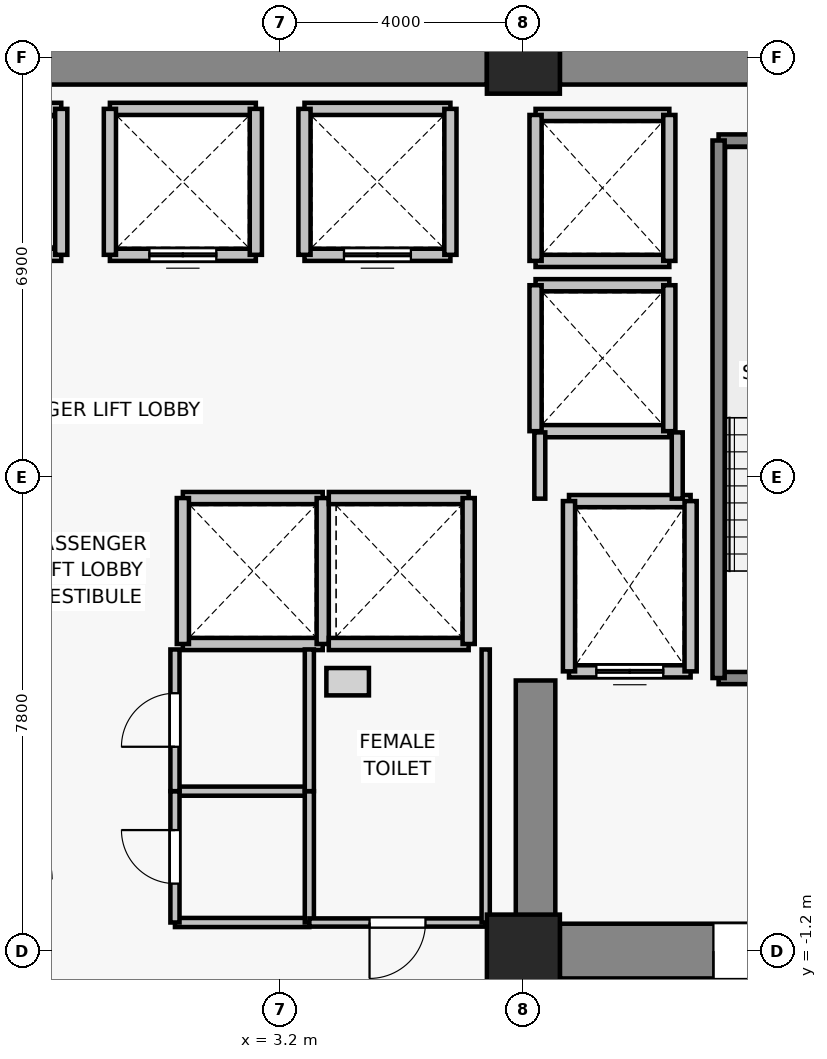
"""IFC4 building model, lengths in metres.
Left out: names, types, materials, properties, quantities, classifications, styles, units other than length and angle.
Written with IfcOpenShell. Run it as: python <this file> out.ifc"""

import sys

from ifc_helpers import new_model, si_unit, direction, frame, frame_2d, origin, origin_2d, place, context, subcontext, project, spatial, rectangle, extrude, source, transform, mapped, element, fill, save


model = new_model("IFC4")
c1 = context("Model", 3, precision=1e-05, world=origin(), true_north=direction((0.0, 1.0)))
c2 = subcontext(c1, "Body", "Model", "MODEL_VIEW")
j1 = project(units=[si_unit("LENGTHUNIT", "METRE"), si_unit("PLANEANGLEUNIT", "RADIAN")], contexts=[c1])
p1 = place(None, origin())
s1 = spatial("IfcSite", under=j1, at=p1, CompositionType="ELEMENT")
p2 = place(p1, origin())
s2 = spatial("IfcBuilding", under=s1, at=p2, CompositionType="ELEMENT")
p3 = place(p2, frame((0.0, 0.0, 47.2)))
s3 = spatial("IfcBuildingStorey", under=s2, at=p3, CompositionType="ELEMENT", Elevation=47.2)
for number, where, z_axis, x_axis in (
    (1, (7.2, -1.2, 0.0), (0.0, 0.0, 1.0), (1.0, 0.0, 0.0)),
    (2, (7.2, 13.5, 0.0), (0.0, 0.0, 1.0), (1.0, 0.0, 0.0)),
):
    element("IfcColumn", number, at=place(p3, frame(where, z_axis=z_axis, x_axis=x_axis)), inside=s3, PredefinedType="COLUMN", context=c2, shape_type="SweptSolid", body=[
        extrude(rectangle(XDim=1.2, YDim=1.2, at=origin_2d()), origin(), (0.0, 0.0, 1.0), 3.3),
    ])
p4 = place(p3, frame((-6.6, 13.5, 0.0), z_axis=(0.0, 0.0, 1.0), x_axis=(1.0, 0.0, 0.0)))
e3 = element("IfcWall", 3, at=p4, inside=s3, PredefinedType="SHEAR", context=c2, shape_type="SweptSolid", body=[
    extrude(rectangle(XDim=13.2, YDim=0.9, at=frame_2d((6.6, 0.0))), origin(), (0.0, 0.0, 1.0), 3.075),
])
p5 = place(p3, frame((7.8, 13.5, 0.0), z_axis=(0.0, 0.0, 1.0), x_axis=(1.0, 0.0, 0.0)))
e4 = element("IfcWall", 4, at=p5, inside=s3, PredefinedType="SHEAR", context=c2, shape_type="SweptSolid", body=[
    extrude(rectangle(XDim=6.0, YDim=0.9, at=frame_2d((3.0, 0.0))), origin(), (0.0, 0.0, 1.0), 3.075),
])
p6 = place(p3, frame((13.8, -1.2, 0.0), z_axis=(0.0, 0.0, 1.0), x_axis=(-1.0, 0.0, 0.0)))
e5 = element("IfcWall", 5, at=p6, inside=s3, PredefinedType="SHEAR", context=c2, shape_type="SweptSolid", body=[
    extrude(rectangle(XDim=6.0, YDim=0.9, at=frame_2d((3.0, 0.0))), origin(), (0.0, 0.0, 1.0), 3.075),
])
p7 = place(p6, frame((2.325, 0.0, 0.0)))
e6 = element("IfcOpeningElement", 6, at=p7, cuts=e5, PredefinedType="OPENING", context=c2, shape_type="SweptSolid", body=[
    extrude(rectangle(XDim=1.15, YDim=2.15, at=frame_2d((0.575, 1.075))), frame((0.0, 0.46, 0.0), z_axis=(0.0, -1.0, 0.0), x_axis=(1.0, 0.0, 0.0)), (0.0, 0.0, 1.0), 0.92),
])
p8 = place(p3, frame((7.4, -0.75, 0.0), z_axis=(0.0, 0.0, 1.0), x_axis=(0.0, 1.0, 0.0)))
e7 = element("IfcWall", 7, at=p8, inside=s3, PredefinedType="SHEAR", context=c2, shape_type="SweptSolid", body=[
    extrude(rectangle(XDim=4.0, YDim=0.65, at=frame_2d((2.0, 0.0))), origin(), (0.0, 0.0, 1.0), 3.075),
])
p9 = place(p3, frame((9.95, 3.4, 0.0), z_axis=(0.0, 0.0, 1.0), x_axis=(-1.0, 0.0, 0.0)))
e8 = element("IfcWall", 8, at=p9, inside=s3, PredefinedType="SOLIDWALL", context=c2, shape_type="SweptSolid", body=[
    extrude(rectangle(XDim=2.0, YDim=0.2, at=frame_2d((1.0, 0.0))), origin(), (0.0, 0.0, 1.0), 3.075),
])
p10 = place(p9, frame((0.45, 0.0, 0.0)))
e9 = element("IfcOpeningElement", 9, at=p10, cuts=e8, PredefinedType="OPENING", context=c2, shape_type="SweptSolid", body=[
    extrude(rectangle(XDim=1.1, YDim=2.2, at=frame_2d((0.55, 1.1))), frame((0.0, 0.11, 0.0), z_axis=(0.0, -1.0, 0.0), x_axis=(1.0, 0.0, 0.0)), (0.0, 0.0, 1.0), 0.22),
])
p11 = place(p3, frame((7.95, 6.2, 0.0), z_axis=(0.0, 0.0, 1.0), x_axis=(1.0, 0.0, 0.0)))
e10 = element("IfcWall", 10, at=p11, inside=s3, PredefinedType="SOLIDWALL", context=c2, shape_type="SweptSolid", body=[
    extrude(rectangle(XDim=2.0, YDim=0.2, at=frame_2d((1.0, 0.0))), origin(), (0.0, 0.0, 1.0), 3.075),
])
for number, where, z_axis, x_axis in (
    (11, (7.95, 3.4, 0.0), (0.0, 0.0, 1.0), (0.0, 1.0, 0.0)),
    (12, (9.95, 6.2, 0.0), (0.0, 0.0, 1.0), (0.0, -1.0, 0.0)),
):
    element("IfcWall", number, at=place(p3, frame(where, z_axis=z_axis, x_axis=x_axis)), inside=s3, PredefinedType="SOLIDWALL", context=c2, shape_type="SweptSolid", body=[
        extrude(rectangle(XDim=2.8, YDim=0.2, at=frame_2d((1.4, 0.0))), origin(), (0.0, 0.0, 1.0), 3.075),
    ])
p12 = place(p3, frame((-0.4, 10.25, 0.0), z_axis=(0.0, 0.0, 1.0), x_axis=(-1.0, 0.0, 0.0)))
e13 = element("IfcWall", 13, at=p12, inside=s3, PredefinedType="SOLIDWALL", context=c2, shape_type="SweptSolid", body=[
    extrude(rectangle(XDim=2.4, YDim=0.2, at=frame_2d((1.2, 0.0))), origin(), (0.0, 0.0, 1.0), 3.075),
])
p13 = place(p12, frame((0.65, 0.0, 0.0)))
e14 = element("IfcOpeningElement", 14, at=p13, cuts=e13, PredefinedType="OPENING", context=c2, shape_type="SweptSolid", body=[
    extrude(rectangle(XDim=1.1, YDim=2.2, at=frame_2d((0.55, 1.1))), frame((0.0, 0.11, 0.0), z_axis=(0.0, -1.0, 0.0), x_axis=(1.0, 0.0, 0.0)), (0.0, 0.0, 1.0), 0.22),
])
p14 = place(p3, frame((-2.8, 12.65, 0.0), z_axis=(0.0, 0.0, 1.0), x_axis=(1.0, 0.0, 0.0)))
e15 = element("IfcWall", 15, at=p14, inside=s3, PredefinedType="SOLIDWALL", context=c2, shape_type="SweptSolid", body=[
    extrude(rectangle(XDim=2.4, YDim=0.2, at=frame_2d((1.2, 0.0))), origin(), (0.0, 0.0, 1.0), 3.075),
])
p15 = place(p3, frame((-0.4, 12.65, 0.0), z_axis=(0.0, 0.0, 1.0), x_axis=(0.0, -1.0, 0.0)))
e16 = element("IfcWall", 16, at=p15, inside=s3, PredefinedType="SOLIDWALL", context=c2, shape_type="SweptSolid", body=[
    extrude(rectangle(XDim=2.4, YDim=0.2, at=frame_2d((1.2, 0.0))), origin(), (0.0, 0.0, 1.0), 3.075),
])
p16 = place(p3, frame((2.8, 10.25, 0.0), z_axis=(0.0, 0.0, 1.0), x_axis=(-1.0, 0.0, 0.0)))
e17 = element("IfcWall", 17, at=p16, inside=s3, PredefinedType="SOLIDWALL", context=c2, shape_type="SweptSolid", body=[
    extrude(rectangle(XDim=2.4, YDim=0.2, at=frame_2d((1.2, 0.0))), origin(), (0.0, 0.0, 1.0), 3.075),
])
p17 = place(p16, frame((0.65, 0.0, 0.0)))
e18 = element("IfcOpeningElement", 18, at=p17, cuts=e17, PredefinedType="OPENING", context=c2, shape_type="SweptSolid", body=[
    extrude(rectangle(XDim=1.1, YDim=2.2, at=frame_2d((0.55, 1.1))), frame((0.0, 0.11, 0.0), z_axis=(0.0, -1.0, 0.0), x_axis=(1.0, 0.0, 0.0)), (0.0, 0.0, 1.0), 0.22),
])
p18 = place(p3, frame((0.4, 12.65, 0.0), z_axis=(0.0, 0.0, 1.0), x_axis=(1.0, 0.0, 0.0)))
e19 = element("IfcWall", 19, at=p18, inside=s3, PredefinedType="SOLIDWALL", context=c2, shape_type="SweptSolid", body=[
    extrude(rectangle(XDim=2.4, YDim=0.2, at=frame_2d((1.2, 0.0))), origin(), (0.0, 0.0, 1.0), 3.075),
])
for number, where, z_axis, x_axis in (
    (20, (0.4, 10.25, 0.0), (0.0, 0.0, 1.0), (0.0, 1.0, 0.0)),
    (21, (2.8, 12.65, 0.0), (0.0, 0.0, 1.0), (0.0, -1.0, 0.0)),
):
    element("IfcWall", number, at=place(p3, frame(where, z_axis=z_axis, x_axis=x_axis)), inside=s3, PredefinedType="SOLIDWALL", context=c2, shape_type="SweptSolid", body=[
        extrude(rectangle(XDim=2.4, YDim=0.2, at=frame_2d((1.2, 0.0))), origin(), (0.0, 0.0, 1.0), 3.075),
    ])
p19 = place(p3, frame((6.0, 10.25, 0.0), z_axis=(0.0, 0.0, 1.0), x_axis=(-1.0, 0.0, 0.0)))
e22 = element("IfcWall", 22, at=p19, inside=s3, PredefinedType="SOLIDWALL", context=c2, shape_type="SweptSolid", body=[
    extrude(rectangle(XDim=2.4, YDim=0.2, at=frame_2d((1.2, 0.0))), origin(), (0.0, 0.0, 1.0), 3.075),
])
p20 = place(p19, frame((0.65, 0.0, 0.0)))
e23 = element("IfcOpeningElement", 23, at=p20, cuts=e22, PredefinedType="OPENING", context=c2, shape_type="SweptSolid", body=[
    extrude(rectangle(XDim=1.1, YDim=2.2, at=frame_2d((0.55, 1.1))), frame((0.0, 0.11, 0.0), z_axis=(0.0, -1.0, 0.0), x_axis=(1.0, 0.0, 0.0)), (0.0, 0.0, 1.0), 0.22),
])
for number, where, z_axis, x_axis in (
    (24, (3.6, 12.65, 0.0), (0.0, 0.0, 1.0), (1.0, 0.0, 0.0)),
    (25, (3.6, 10.25, 0.0), (0.0, 0.0, 1.0), (0.0, 1.0, 0.0)),
    (26, (6.0, 12.65, 0.0), (0.0, 0.0, 1.0), (0.0, -1.0, 0.0)),
):
    element("IfcWall", number, at=place(p3, frame(where, z_axis=z_axis, x_axis=x_axis)), inside=s3, PredefinedType="SOLIDWALL", context=c2, shape_type="SweptSolid", body=[
        extrude(rectangle(XDim=2.4, YDim=0.2, at=frame_2d((1.2, 0.0))), origin(), (0.0, 0.0, 1.0), 3.075),
    ])
for number, where, z_axis, x_axis in (
    (27, (3.9, 3.85, 0.0), (0.0, 0.0, 1.0), (-1.0, 0.0, 0.0)),
    (28, (1.6, 6.25, 0.0), (0.0, 0.0, 1.0), (1.0, 0.0, 0.0)),
):
    element("IfcWall", number, at=place(p3, frame(where, z_axis=z_axis, x_axis=x_axis)), inside=s3, PredefinedType="SOLIDWALL", context=c2, shape_type="SweptSolid", body=[
        extrude(rectangle(XDim=2.3, YDim=0.2, at=frame_2d((1.15, 0.0))), origin(), (0.0, 0.0, 1.0), 3.075),
    ])
for number, where, z_axis, x_axis in (
    (29, (1.6, 3.85, 0.0), (0.0, 0.0, 1.0), (0.0, 1.0, 0.0)),
    (30, (3.9, 6.25, 0.0), (0.0, 0.0, 1.0), (0.0, -1.0, 0.0)),
):
    element("IfcWall", number, at=place(p3, frame(where, z_axis=z_axis, x_axis=x_axis)), inside=s3, PredefinedType="SOLIDWALL", context=c2, shape_type="SweptSolid", body=[
        extrude(rectangle(XDim=2.4, YDim=0.2, at=frame_2d((1.2, 0.0))), origin(), (0.0, 0.0, 1.0), 3.075),
    ])
for number, where, z_axis, x_axis in (
    (31, (6.3, 3.85, 0.0), (0.0, 0.0, 1.0), (-1.0, 0.0, 0.0)),
    (32, (4.0, 6.25, 0.0), (0.0, 0.0, 1.0), (1.0, 0.0, 0.0)),
):
    element("IfcWall", number, at=place(p3, frame(where, z_axis=z_axis, x_axis=x_axis)), inside=s3, PredefinedType="SOLIDWALL", context=c2, shape_type="SweptSolid", body=[
        extrude(rectangle(XDim=2.3, YDim=0.2, at=frame_2d((1.15, 0.0))), origin(), (0.0, 0.0, 1.0), 3.075),
    ])
p21 = place(p3, frame((6.3, 6.25, 0.0), z_axis=(0.0, 0.0, 1.0), x_axis=(0.0, -1.0, 0.0)))
e33 = element("IfcWall", 33, at=p21, inside=s3, PredefinedType="SOLIDWALL", context=c2, shape_type="SweptSolid", body=[
    extrude(rectangle(XDim=2.4, YDim=0.2, at=frame_2d((1.2, 0.0))), origin(), (0.0, 0.0, 1.0), 3.075),
])
for number, where, z_axis, x_axis in (
    (34, (9.6, 7.35, 0.0), (0.0, 0.0, 1.0), (-1.0, 0.0, 0.0)),
    (35, (7.4, 9.75, 0.0), (0.0, 0.0, 1.0), (1.0, 0.0, 0.0)),
):
    element("IfcWall", number, at=place(p3, frame(where, z_axis=z_axis, x_axis=x_axis)), inside=s3, PredefinedType="SOLIDWALL", context=c2, shape_type="SweptSolid", body=[
        extrude(rectangle(XDim=2.2, YDim=0.2, at=frame_2d((1.1, 0.0))), origin(), (0.0, 0.0, 1.0), 2.465),
    ])
p22 = place(p3, frame((7.4, 7.35, 0.0), z_axis=(0.0, 0.0, 1.0), x_axis=(0.0, 1.0, 0.0)))
e36 = element("IfcWall", 36, at=p22, inside=s3, PredefinedType="SOLIDWALL", context=c2, shape_type="SweptSolid", body=[
    extrude(rectangle(XDim=2.4, YDim=0.2, at=frame_2d((1.2, 0.0))), origin(), (0.0, 0.0, 1.0), 2.465),
])
p23 = place(p3, frame((9.6, 9.75, 0.0), z_axis=(0.0, 0.0, 1.0), x_axis=(0.0, -1.0, 0.0)))
e37 = element("IfcWall", 37, at=p23, inside=s3, PredefinedType="SOLIDWALL", context=c2, shape_type="SweptSolid", body=[
    extrude(rectangle(XDim=2.4, YDim=0.2, at=frame_2d((1.2, 0.0))), origin(), (0.0, 0.0, 1.0), 3.075),
])
for number, where, z_axis, x_axis in (
    (38, (9.6, 10.15, 0.0), (0.0, 0.0, 1.0), (-1.0, 0.0, 0.0)),
    (39, (7.4, 12.55, 0.0), (0.0, 0.0, 1.0), (1.0, 0.0, 0.0)),
):
    element("IfcWall", number, at=place(p3, frame(where, z_axis=z_axis, x_axis=x_axis)), inside=s3, PredefinedType="SOLIDWALL", context=c2, shape_type="SweptSolid", body=[
        extrude(rectangle(XDim=2.2, YDim=0.2, at=frame_2d((1.1, 0.0))), origin(), (0.0, 0.0, 1.0), 2.465),
    ])
p24 = place(p3, frame((7.4, 10.15, 0.0), z_axis=(0.0, 0.0, 1.0), x_axis=(0.0, 1.0, 0.0)))
e40 = element("IfcWall", 40, at=p24, inside=s3, PredefinedType="SOLIDWALL", context=c2, shape_type="SweptSolid", body=[
    extrude(rectangle(XDim=2.4, YDim=0.2, at=frame_2d((1.2, 0.0))), origin(), (0.0, 0.0, 1.0), 2.465),
])
p25 = place(p3, frame((9.6, 12.55, 0.0), z_axis=(0.0, 0.0, 1.0), x_axis=(0.0, -1.0, 0.0)))
e41 = element("IfcWall", 41, at=p25, inside=s3, PredefinedType="SOLIDWALL", context=c2, shape_type="SweptSolid", body=[
    extrude(rectangle(XDim=2.4, YDim=0.2, at=frame_2d((1.2, 0.0))), origin(), (0.0, 0.0, 1.0), 3.075),
])
p26 = place(p3, frame((13.93, 3.29, 0.0), z_axis=(0.0, 0.0, 1.0), x_axis=(-1.0, 0.0, 0.0)))
e42 = element("IfcWall", 42, at=p26, inside=s3, PredefinedType="SOLIDWALL", context=c2, shape_type="SweptSolid", body=[
    extrude(rectangle(XDim=3.52, YDim=0.2, at=frame_2d((1.76, 0.0))), origin(), (0.0, 0.0, 1.0), 3.075),
])
p27 = place(p26, frame((1.205, 0.0, 0.0)))
e43 = element("IfcOpeningElement", 43, at=p27, cuts=e42, PredefinedType="OPENING", context=c2, shape_type="SweptSolid", body=[
    extrude(rectangle(XDim=1.15, YDim=2.15, at=frame_2d((0.575, 1.075))), frame((0.0, 0.11, 0.0), z_axis=(0.0, -1.0, 0.0), x_axis=(1.0, 0.0, 0.0)), (0.0, 0.0, 1.0), 0.22),
])
p28 = place(p3, frame((10.41, 12.13, 0.0), z_axis=(0.0, 0.0, 1.0), x_axis=(1.0, 0.0, 0.0)))
e44 = element("IfcWall", 44, at=p28, inside=s3, PredefinedType="SOLIDWALL", context=c2, shape_type="SweptSolid", body=[
    extrude(rectangle(XDim=3.52, YDim=0.2, at=frame_2d((1.76, 0.0))), origin(), (0.0, 0.0, 1.0), 3.075),
])
p29 = place(p3, frame((10.41, 3.29, 0.0), z_axis=(0.0, 0.0, 1.0), x_axis=(0.0, 1.0, 0.0)))
e45 = element("IfcWall", 45, at=p29, inside=s3, PredefinedType="SOLIDWALL", context=c2, shape_type="SweptSolid", body=[
    extrude(rectangle(XDim=8.84, YDim=0.2, at=frame_2d((4.42, 0.0))), origin(), (0.0, 0.0, 1.0), 3.075),
])
p30 = place(p3, frame((7.47, 6.24, 0.0), z_axis=(0.0, 0.0, 1.0), x_axis=(0.0, 1.0, 0.0)))
e46 = element("IfcWall", 46, at=p30, inside=s3, PredefinedType="PARTITIONING", context=c2, shape_type="SweptSolid", body=[
    extrude(rectangle(XDim=1.09, YDim=0.18, at=frame_2d((0.545, 0.0))), origin(), (0.0, 0.0, 1.0), 2.465),
])
p31 = place(p3, frame((9.73, 7.33, 0.0), z_axis=(0.0, 0.0, 1.0), x_axis=(0.0, -1.0, 0.0)))
e47 = element("IfcWall", 47, at=p31, inside=s3, PredefinedType="PARTITIONING", context=c2, shape_type="SweptSolid", body=[
    extrude(rectangle(XDim=1.09, YDim=0.18, at=frame_2d((0.545, 0.0))), origin(), (0.0, 0.0, 1.0), 3.075),
])
for number, where, z_axis, x_axis in (
    (48, (3.68, -0.73, 0.0), (0.0, 0.0, 1.0), (-1.0, 0.0, 0.0)),
    (49, (1.47, 1.43, 0.0), (0.0, 0.0, 1.0), (1.0, 0.0, 0.0)),
):
    element("IfcWall", number, at=place(p3, frame(where, z_axis=z_axis, x_axis=x_axis)), inside=s3, PredefinedType="PARTITIONING", context=c2, shape_type="SweptSolid", body=[
        extrude(rectangle(XDim=2.21, YDim=0.15, at=frame_2d((1.105, 0.0))), origin(), (0.0, 0.0, 1.0), 3.075),
    ])
p32 = place(p3, frame((1.47, -0.73, 0.0), z_axis=(0.0, 0.0, 1.0), x_axis=(0.0, 1.0, 0.0)))
e50 = element("IfcWall", 50, at=p32, inside=s3, PredefinedType="PARTITIONING", context=c2, shape_type="SweptSolid", body=[
    extrude(rectangle(XDim=2.16, YDim=0.15, at=frame_2d((1.08, 0.0))), origin(), (0.0, 0.0, 1.0), 3.075),
])
p33 = place(p32, frame((0.64, 0.0, 0.0)))
e51 = element("IfcOpeningElement", 51, at=p33, cuts=e50, PredefinedType="OPENING", context=c2, shape_type="SweptSolid", body=[
    extrude(rectangle(XDim=0.88, YDim=2.1, at=frame_2d((0.44, 1.05))), frame((0.0, 0.085, 0.0), z_axis=(0.0, -1.0, 0.0), x_axis=(1.0, 0.0, 0.0)), (0.0, 0.0, 1.0), 0.17),
])
p34 = place(p3, frame((3.68, 1.43, 0.0), z_axis=(0.0, 0.0, 1.0), x_axis=(0.0, -1.0, 0.0)))
e52 = element("IfcWall", 52, at=p34, inside=s3, PredefinedType="PARTITIONING", context=c2, shape_type="SweptSolid", body=[
    extrude(rectangle(XDim=2.16, YDim=0.15, at=frame_2d((1.08, 0.0))), origin(), (0.0, 0.0, 1.0), 3.075),
])
p35 = place(p3, frame((1.47, 1.43, 0.0), z_axis=(0.0, 0.0, 1.0), x_axis=(0.0, 1.0, 0.0)))
e53 = element("IfcWall", 53, at=p35, inside=s3, PredefinedType="PARTITIONING", context=c2, shape_type="SweptSolid", body=[
    extrude(rectangle(XDim=2.33, YDim=0.15, at=frame_2d((1.165, 0.0))), origin(), (0.0, 0.0, 1.0), 3.075),
])
p36 = place(p35, frame((0.73, 0.0, 0.0)))
e54 = element("IfcOpeningElement", 54, at=p36, cuts=e53, PredefinedType="OPENING", context=c2, shape_type="SweptSolid", body=[
    extrude(rectangle(XDim=0.88, YDim=2.15, at=frame_2d((0.44, 1.075))), frame((0.0, 0.085, 0.0), z_axis=(0.0, -1.0, 0.0), x_axis=(1.0, 0.0, 0.0)), (0.0, 0.0, 1.0), 0.17),
])
p37 = place(p3, frame((3.68, 3.76, 0.0), z_axis=(0.0, 0.0, 1.0), x_axis=(0.0, -1.0, 0.0)))
e55 = element("IfcWall", 55, at=p37, inside=s3, PredefinedType="PARTITIONING", context=c2, shape_type="SweptSolid", body=[
    extrude(rectangle(XDim=2.33, YDim=0.15, at=frame_2d((1.165, 0.0))), origin(), (0.0, 0.0, 1.0), 3.075),
])
p38 = place(p3, frame((6.58, -0.73, 0.0), z_axis=(0.0, 0.0, 1.0), x_axis=(-1.0, 0.0, 0.0)))
e56 = element("IfcWall", 56, at=p38, inside=s3, PredefinedType="PARTITIONING", context=c2, shape_type="SweptSolid", body=[
    extrude(rectangle(XDim=2.9, YDim=0.135, at=frame_2d((1.45, 0.0))), origin(), (0.0, 0.0, 1.0), 3.075),
])
p39 = place(p38, frame((0.99, 0.0, 0.0)))
e57 = element("IfcOpeningElement", 57, at=p39, cuts=e56, PredefinedType="OPENING", context=c2, shape_type="SweptSolid", body=[
    extrude(rectangle(XDim=0.92, YDim=2.1, at=frame_2d((0.46, 1.05))), frame((0.0, 0.077, 0.0), z_axis=(0.0, -1.0, 0.0), x_axis=(1.0, 0.0, 0.0)), (0.0, 0.0, 1.0), 0.155),
])
p40 = place(p3, frame((6.58, 3.76, 0.0), z_axis=(0.0, 0.0, 1.0), x_axis=(0.0, -1.0, 0.0)))
e58 = element("IfcWall", 58, at=p40, inside=s3, PredefinedType="PARTITIONING", context=c2, shape_type="SweptSolid", body=[
    extrude(rectangle(XDim=4.49, YDim=0.135, at=frame_2d((2.245, 0.0))), origin(), (0.0, 0.0, 1.0), 3.075),
])
m1 = source(origin(), c2, "Body", "SweptSolid", [
    extrude(rectangle(XDim=1.1, YDim=2.2, at=frame_2d((0.55, 1.1))), frame((0.0, 0.025, 0.0), z_axis=(0.0, -1.0, 0.0), x_axis=(1.0, 0.0, 0.0)), (0.0, 0.0, 1.0), 0.05),
])
p41 = place(p10, origin())
e59 = element("IfcDoor", 59, at=p41, inside=s3, OperationType="DOUBLE_DOOR_SLIDING", PredefinedType="DOOR", context=c2, shape_type="MappedRepresentation", body=[
    mapped(m1, transform((0.0, 0.0, 0.0), x_axis=(1.0, 0.0, 0.0), y_axis=(0.0, 1.0, 0.0), z_axis=(0.0, 0.0, 1.0), scale=1.0)),
])
fill(e9, e59)
p42 = place(p17, origin())
e60 = element("IfcDoor", 60, at=p42, inside=s3, OperationType="DOUBLE_DOOR_SLIDING", PredefinedType="DOOR", context=c2, shape_type="MappedRepresentation", body=[
    mapped(m1, transform((0.0, 0.0, 0.0), x_axis=(1.0, 0.0, 0.0), y_axis=(0.0, 1.0, 0.0), z_axis=(0.0, 0.0, 1.0), scale=1.0)),
])
fill(e18, e60)
p43 = place(p20, origin())
e61 = element("IfcDoor", 61, at=p43, inside=s3, OperationType="DOUBLE_DOOR_SLIDING", PredefinedType="DOOR", context=c2, shape_type="MappedRepresentation", body=[
    mapped(m1, transform((0.0, 0.0, 0.0), x_axis=(1.0, 0.0, 0.0), y_axis=(0.0, 1.0, 0.0), z_axis=(0.0, 0.0, 1.0), scale=1.0)),
])
fill(e23, e61)
m2 = source(origin(), c2, "Body", "SweptSolid", [
    extrude(rectangle(XDim=1.15, YDim=2.15, at=frame_2d((0.575, 1.075))), frame((0.0, 0.025, 0.0), z_axis=(0.0, -1.0, 0.0), x_axis=(1.0, 0.0, 0.0)), (0.0, 0.0, 1.0), 0.05),
])
p44 = place(p7, origin())
e62 = element("IfcDoor", 62, at=p44, inside=s3, OperationType="SINGLE_SWING_RIGHT", PredefinedType="DOOR", context=c2, shape_type="MappedRepresentation", body=[
    mapped(m2, transform((0.0, 0.0, 0.0), x_axis=(1.0, 0.0, 0.0), y_axis=(0.0, 1.0, 0.0), z_axis=(0.0, 0.0, 1.0), scale=1.0)),
])
fill(e6, e62)
m3 = source(origin(), c2, "Body", "SweptSolid", [
    extrude(rectangle(XDim=0.88, YDim=2.1, at=frame_2d((0.44, 1.05))), frame((0.0, 0.025, 0.0), z_axis=(0.0, -1.0, 0.0), x_axis=(1.0, 0.0, 0.0)), (0.0, 0.0, 1.0), 0.05),
])
p45 = place(p33, origin())
e63 = element("IfcDoor", 63, at=p45, inside=s3, OperationType="SINGLE_SWING_RIGHT", PredefinedType="DOOR", context=c2, shape_type="MappedRepresentation", body=[
    mapped(m3, transform((0.0, 0.0, 0.0), x_axis=(1.0, 0.0, 0.0), y_axis=(0.0, 1.0, 0.0), z_axis=(0.0, 0.0, 1.0), scale=1.0)),
])
fill(e51, e63)
m4 = source(origin(), c2, "Body", "SweptSolid", [
    extrude(rectangle(XDim=0.88, YDim=2.15, at=frame_2d((0.44, 1.075))), frame((0.0, 0.025, 0.0), z_axis=(0.0, -1.0, 0.0), x_axis=(1.0, 0.0, 0.0)), (0.0, 0.0, 1.0), 0.05),
])
p46 = place(p36, origin())
e64 = element("IfcDoor", 64, at=p46, inside=s3, OperationType="SINGLE_SWING_LEFT", PredefinedType="DOOR", context=c2, shape_type="MappedRepresentation", body=[
    mapped(m4, transform((0.0, 0.0, 0.0), x_axis=(1.0, 0.0, 0.0), y_axis=(0.0, 1.0, 0.0), z_axis=(0.0, 0.0, 1.0), scale=1.0)),
])
fill(e54, e64)
m5 = source(origin(), c2, "Body", "SweptSolid", [
    extrude(rectangle(XDim=0.92, YDim=2.1, at=frame_2d((0.46, 1.05))), frame((0.0, 0.025, 0.0), z_axis=(0.0, -1.0, 0.0), x_axis=(1.0, 0.0, 0.0)), (0.0, 0.0, 1.0), 0.05),
])
p47 = place(p39, origin())
e65 = element("IfcDoor", 65, at=p47, inside=s3, OperationType="SINGLE_SWING_RIGHT", PredefinedType="DOOR", context=c2, shape_type="MappedRepresentation", body=[
    mapped(m5, transform((0.0, 0.0, 0.0), x_axis=(1.0, 0.0, 0.0), y_axis=(0.0, 1.0, 0.0), z_axis=(0.0, 0.0, 1.0), scale=1.0)),
])
fill(e57, e65)
save(model, sys.argv[1])
